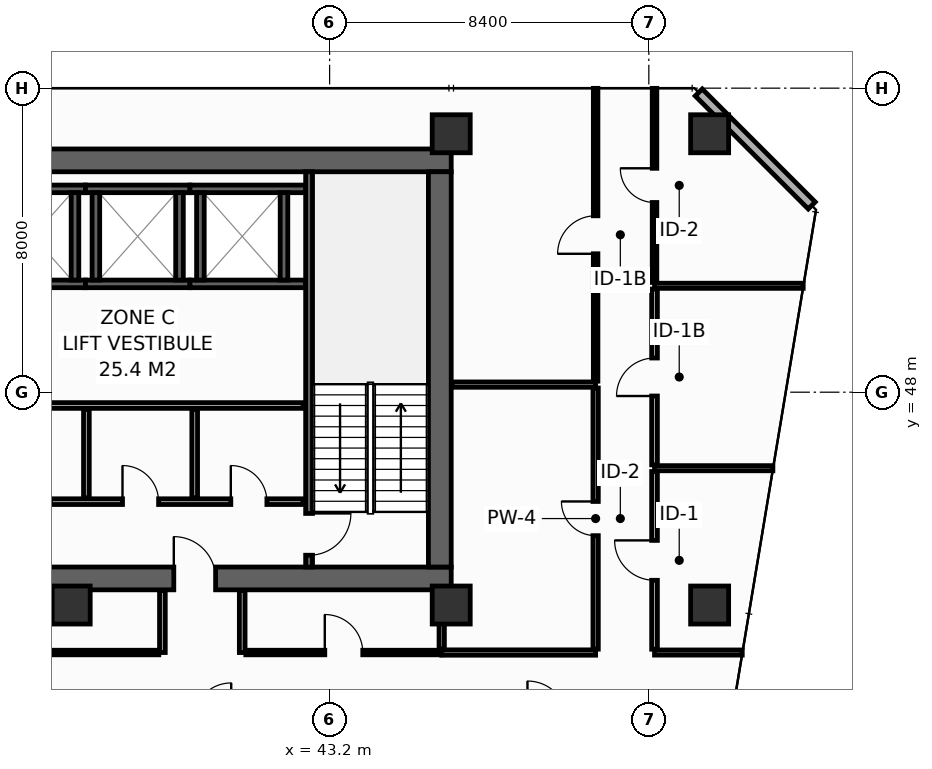
"""IFC4 building model, lengths in metres.
Left out: names, types, materials, properties, quantities, classifications, styles, units other than length and angle.
Written with IfcOpenShell. Run it as: python <this file> out.ifc"""

import sys

from ifc_helpers import new_model, si_unit, direction, frame, frame_2d, origin, origin_2d, place, context, subcontext, project, spatial, rectangle, hollow_rectangle, extrude, element, fill, save


model = new_model("IFC4")
c1 = context("Model", 3, precision=1e-05, world=origin(), true_north=direction((0.0, 1.0)))
c2 = subcontext(c1, "Body", "Model", "MODEL_VIEW")
j1 = project(units=[si_unit("LENGTHUNIT", "METRE"), si_unit("PLANEANGLEUNIT", "RADIAN")], contexts=[c1])
p1 = place(None, origin())
s1 = spatial("IfcSite", under=j1, at=p1, CompositionType="ELEMENT")
p2 = place(p1, origin())
s2 = spatial("IfcBuilding", under=s1, at=p2, CompositionType="ELEMENT")
p3 = place(p2, frame((0.0, 0.0, 106.0)))
s3 = spatial("IfcBuildingStorey", under=s2, at=p3, CompositionType="ELEMENT", Elevation=106.0)
p4 = place(p3, frame((13.5, 43.1, 0.0), z_axis=(0.0, 0.0, 1.0), x_axis=(1.0, 0.0, 0.0)))
e1 = element("IfcWall", 1, at=p4, inside=s3, PredefinedType="SHEAR", context=c2, shape_type="SweptSolid", body=[
    extrude(rectangle(XDim=32.9, YDim=0.6, at=frame_2d((16.45, 0.0))), origin(), (0.0, 0.0, 1.0), 4.15),
])
p5 = place(p4, frame((5.4, 0.0, 0.0)))
e2 = element("IfcOpeningElement", 2, at=p5, cuts=e1, PredefinedType="OPENING", context=c2, shape_type="SweptSolid", body=[
    extrude(rectangle(XDim=1.1, YDim=2.15, at=frame_2d((0.55, 1.075))), frame((0.0, 0.31, 0.0), z_axis=(0.0, -1.0, 0.0), x_axis=(1.0, 0.0, 0.0)), (0.0, 0.0, 1.0), 0.62),
])
p6 = place(p4, frame((25.6, 0.0, 0.0)))
e3 = element("IfcOpeningElement", 3, at=p6, cuts=e1, PredefinedType="OPENING", context=c2, shape_type="SweptSolid", body=[
    extrude(rectangle(XDim=1.1, YDim=2.15, at=frame_2d((0.55, 1.075))), frame((0.0, 0.31, 0.0), z_axis=(0.0, -1.0, 0.0), x_axis=(1.0, 0.0, 0.0)), (0.0, 0.0, 1.0), 0.62),
])
p7 = place(p3, frame((13.5, 54.1, 0.0), z_axis=(0.0, 0.0, 1.0), x_axis=(1.0, 0.0, 0.0)))
e4 = element("IfcWall", 4, at=p7, inside=s3, PredefinedType="SHEAR", context=c2, shape_type="SweptSolid", body=[
    extrude(rectangle(XDim=32.9, YDim=0.6, at=frame_2d((16.45, 0.0))), origin(), (0.0, 0.0, 1.0), 4.15),
])
p8 = place(p3, frame((46.1, 43.4, 0.0), z_axis=(0.0, 0.0, 1.0), x_axis=(0.0, 1.0, 0.0)))
e5 = element("IfcWall", 5, at=p8, inside=s3, PredefinedType="SHEAR", context=c2, shape_type="SweptSolid", body=[
    extrude(rectangle(XDim=10.4, YDim=0.6, at=frame_2d((5.2, 0.0))), origin(), (0.0, 0.0, 1.0), 4.15),
])
for number, where, z_axis, x_axis in (
    (6, (46.4, 54.8, 0.0), (0.0, 0.0, 1.0), (1.0, 0.0, 0.0)),
    (7, (53.2, 54.8, 0.0), (0.0, 0.0, 1.0), (1.0, 0.0, 0.0)),
    (8, (36.4, 42.4, 0.0), (0.0, 0.0, 1.0), (1.0, 0.0, 0.0)),
    (9, (46.4, 42.4, 0.0), (0.0, 0.0, 1.0), (1.0, 0.0, 0.0)),
    (10, (53.2, 42.4, 0.0), (0.0, 0.0, 1.0), (1.0, 0.0, 0.0)),
):
    element("IfcColumn", number, at=place(p3, frame(where, z_axis=z_axis, x_axis=x_axis)), inside=s3, PredefinedType="COLUMN", context=c2, shape_type="SweptSolid", body=[
        extrude(hollow_rectangle(XDim=1.0, YDim=1.0, WallThickness=0.045, at=origin_2d()), origin(), (0.0, 0.0, 1.0), 4.4),
    ])
for number, where, z_axis, x_axis in (
    (11, (33.95, 50.85, 0.0), (0.0, 0.0, 1.0), (1.0, 0.0, 0.0)),
    (12, (33.95, 53.35, 0.0), (0.0, 0.0, 1.0), (1.0, 0.0, 0.0)),
):
    element("IfcWall", number, at=place(p3, frame(where, z_axis=z_axis, x_axis=x_axis)), inside=s3, PredefinedType="SHEAR", context=c2, shape_type="SweptSolid", body=[
        extrude(rectangle(XDim=2.825, YDim=0.2, at=frame_2d((1.413, 0.0))), origin(), (0.0, 0.0, 1.0), 4.15),
    ])
p9 = place(p3, frame((36.5, 50.95, 0.0), z_axis=(0.0, 0.0, 1.0), x_axis=(0.0, 1.0, 0.0)))
e13 = element("IfcWall", 13, at=p9, inside=s3, PredefinedType="SHEAR", context=c2, shape_type="SweptSolid", body=[
    extrude(rectangle(XDim=2.3, YDim=0.2, at=frame_2d((1.15, 0.0))), origin(), (0.0, 0.0, 1.0), 4.15),
])
for number, where, z_axis, x_axis in (
    (14, (36.775, 50.85, 0.0), (0.0, 0.0, 1.0), (1.0, 0.0, 0.0)),
    (15, (36.775, 53.35, 0.0), (0.0, 0.0, 1.0), (1.0, 0.0, 0.0)),
):
    element("IfcWall", number, at=place(p3, frame(where, z_axis=z_axis, x_axis=x_axis)), inside=s3, PredefinedType="SHEAR", context=c2, shape_type="SweptSolid", body=[
        extrude(rectangle(XDim=2.75, YDim=0.2, at=frame_2d((1.375, 0.0))), origin(), (0.0, 0.0, 1.0), 4.15),
    ])
for number, where, z_axis, x_axis in (
    (16, (37.05, 50.95, 0.0), (0.0, 0.0, 1.0), (0.0, 1.0, 0.0)),
    (17, (39.25, 50.95, 0.0), (0.0, 0.0, 1.0), (0.0, 1.0, 0.0)),
):
    element("IfcWall", number, at=place(p3, frame(where, z_axis=z_axis, x_axis=x_axis)), inside=s3, PredefinedType="SHEAR", context=c2, shape_type="SweptSolid", body=[
        extrude(rectangle(XDim=2.3, YDim=0.2, at=frame_2d((1.15, 0.0))), origin(), (0.0, 0.0, 1.0), 4.15),
    ])
for number, where, z_axis, x_axis in (
    (18, (39.525, 50.85, 0.0), (0.0, 0.0, 1.0), (1.0, 0.0, 0.0)),
    (19, (39.525, 53.35, 0.0), (0.0, 0.0, 1.0), (1.0, 0.0, 0.0)),
):
    element("IfcWall", number, at=place(p3, frame(where, z_axis=z_axis, x_axis=x_axis)), inside=s3, PredefinedType="SHEAR", context=c2, shape_type="SweptSolid", body=[
        extrude(rectangle(XDim=3.045, YDim=0.2, at=frame_2d((1.522, 0.0))), origin(), (0.0, 0.0, 1.0), 4.15),
    ])
for number, where, z_axis, x_axis in (
    (20, (39.8, 50.95, 0.0), (0.0, 0.0, 1.0), (0.0, 1.0, 0.0)),
    (21, (42.0, 50.95, 0.0), (0.0, 0.0, 1.0), (0.0, 1.0, 0.0)),
):
    element("IfcWall", number, at=place(p3, frame(where, z_axis=z_axis, x_axis=x_axis)), inside=s3, PredefinedType="SHEAR", context=c2, shape_type="SweptSolid", body=[
        extrude(rectangle(XDim=2.3, YDim=0.2, at=frame_2d((1.15, 0.0))), origin(), (0.0, 0.0, 1.0), 4.15),
    ])
p10 = place(p3, frame((42.66, 53.8, 0.0), z_axis=(0.0, 0.0, 1.0), x_axis=(0.0, -1.0, 0.0)))
e22 = element("IfcWall", 22, at=p10, inside=s3, PredefinedType="SHEAR", context=c2, shape_type="SweptSolid", body=[
    extrude(rectangle(XDim=10.4, YDim=0.18, at=frame_2d((5.2, 0.0))), origin(), (0.0, 0.0, 1.0), 4.15),
])
p11 = place(p10, frame((8.99, 0.0, 0.0)))
e23 = element("IfcOpeningElement", 23, at=p11, cuts=e22, PredefinedType="OPENING", context=c2, shape_type="SweptSolid", body=[
    extrude(rectangle(XDim=1.1, YDim=2.15, at=frame_2d((0.55, 1.075))), frame((0.0, 0.1, 0.0), z_axis=(0.0, -1.0, 0.0), x_axis=(1.0, 0.0, 0.0)), (0.0, 0.0, 1.0), 0.2),
])
p12 = place(p3, frame((33.95, 45.12, 0.0), z_axis=(0.0, 0.0, 1.0), x_axis=(1.0, 0.0, 0.0)))
e24 = element("IfcWall", 24, at=p12, inside=s3, PredefinedType="PARTITIONING", context=c2, shape_type="SweptSolid", body=[
    extrude(rectangle(XDim=8.55, YDim=0.15, at=frame_2d((4.275, 0.0))), origin(), (0.0, 0.0, 1.0), 4.15),
])
p13 = place(p12, frame((0.95, 0.0, 0.0)))
e25 = element("IfcOpeningElement", 25, at=p13, cuts=e24, PredefinedType="OPENING", context=c2, shape_type="SweptSolid", body=[
    extrude(rectangle(XDim=0.95, YDim=2.15, at=frame_2d((0.475, 1.075))), frame((0.0, 0.085, 0.0), z_axis=(0.0, -1.0, 0.0), x_axis=(1.0, 0.0, 0.0)), (0.0, 0.0, 1.0), 0.17),
])
p14 = place(p12, frame((3.8, 0.0, 0.0)))
e26 = element("IfcOpeningElement", 26, at=p14, cuts=e24, PredefinedType="OPENING", context=c2, shape_type="SweptSolid", body=[
    extrude(rectangle(XDim=0.95, YDim=2.15, at=frame_2d((0.475, 1.075))), frame((0.0, 0.085, 0.0), z_axis=(0.0, -1.0, 0.0), x_axis=(1.0, 0.0, 0.0)), (0.0, 0.0, 1.0), 0.17),
])
p15 = place(p12, frame((6.65, 0.0, 0.0)))
e27 = element("IfcOpeningElement", 27, at=p15, cuts=e24, PredefinedType="OPENING", context=c2, shape_type="SweptSolid", body=[
    extrude(rectangle(XDim=0.95, YDim=2.15, at=frame_2d((0.475, 1.075))), frame((0.0, 0.085, 0.0), z_axis=(0.0, -1.0, 0.0), x_axis=(1.0, 0.0, 0.0)), (0.0, 0.0, 1.0), 0.17),
])
p16 = place(p3, frame((33.95, 47.65, 0.0), z_axis=(0.0, 0.0, 1.0), x_axis=(1.0, 0.0, 0.0)))
e28 = element("IfcWall", 28, at=p16, inside=s3, PredefinedType="PARTITIONING", context=c2, shape_type="SweptSolid", body=[
    extrude(rectangle(XDim=8.55, YDim=0.15, at=frame_2d((4.275, 0.0))), origin(), (0.0, 0.0, 1.0), 4.15),
])
for number, where, z_axis, x_axis in (
    (29, (36.8, 45.22, 0.0), (0.0, 0.0, 1.0), (0.0, 1.0, 0.0)),
    (30, (39.65, 45.22, 0.0), (0.0, 0.0, 1.0), (0.0, 1.0, 0.0)),
):
    element("IfcWall", number, at=place(p3, frame(where, z_axis=z_axis, x_axis=x_axis)), inside=s3, PredefinedType="PARTITIONING", context=c2, shape_type="SweptSolid", body=[
        extrude(rectangle(XDim=2.33, YDim=0.15, at=frame_2d((1.165, 0.0))), origin(), (0.0, 0.0, 1.0), 4.15),
    ])
p17 = place(p3, frame((55.887, 52.913, 0.0), z_axis=(0.0, 0.0, 1.0), x_axis=(-0.707106781187, 0.707106781187, 0.0)))
e31 = element("IfcWall", 31, at=p17, inside=s3, PredefinedType="STANDARD", context=c2, shape_type="SweptSolid", body=[
    extrude(rectangle(XDim=4.206, YDim=0.26, at=frame_2d((2.103, 0.0))), origin(), (0.0, 0.0, 1.0), 4.15),
])
p18 = place(p3, frame((46.15, 41.15, 0.0), z_axis=(0.0, 0.0, 1.0), x_axis=(1.0, 0.0, 0.0)))
e32 = element("IfcWall", 32, at=p18, inside=s3, PredefinedType="PARTITIONING", context=c2, shape_type="SweptSolid", body=[
    extrude(rectangle(XDim=4.05, YDim=0.14, at=frame_2d((2.025, 0.0))), origin(), (0.0, 0.0, 1.0), 4.15),
])
p19 = place(p3, frame((46.15, 41.24, 0.0), z_axis=(0.0, 0.0, 1.0), x_axis=(0.0, 1.0, 0.0)))
e33 = element("IfcWall", 33, at=p19, inside=s3, PredefinedType="PARTITIONING", context=c2, shape_type="SweptSolid", body=[
    extrude(rectangle(XDim=1.54, YDim=0.14, at=frame_2d((0.77, 0.0))), origin(), (0.0, 0.0, 1.0), 4.15),
])
p20 = place(p3, frame((46.42, 48.2, 0.0), z_axis=(0.0, 0.0, 1.0), x_axis=(1.0, 0.0, 0.0)))
e34 = element("IfcWall", 34, at=p20, inside=s3, PredefinedType="PARTITIONING", context=c2, shape_type="SweptSolid", body=[
    extrude(rectangle(XDim=3.78, YDim=0.14, at=frame_2d((1.89, 0.0))), origin(), (0.0, 0.0, 1.0), 4.15),
])
p21 = place(p3, frame((50.2, 41.24, 0.0), z_axis=(0.0, 0.0, 1.0), x_axis=(0.0, 1.0, 0.0)))
e35 = element("IfcWall", 35, at=p21, inside=s3, PredefinedType="PARTITIONING", context=c2, shape_type="SweptSolid", body=[
    extrude(rectangle(XDim=6.87, YDim=0.14, at=frame_2d((3.435, 0.0))), origin(), (0.0, 0.0, 1.0), 3.335),
])
p22 = place(p21, frame((2.985, 0.0, 0.0)))
e36 = element("IfcOpeningElement", 36, at=p22, cuts=e35, PredefinedType="OPENING", context=c2, shape_type="SweptSolid", body=[
    extrude(rectangle(XDim=0.9, YDim=2.1, at=frame_2d((0.45, 1.05))), frame((0.0, 0.08, 0.0), z_axis=(0.0, -1.0, 0.0), x_axis=(1.0, 0.0, 0.0)), (0.0, 0.0, 1.0), 0.16),
])
p23 = place(p3, frame((50.2, 48.29, 0.0), z_axis=(0.0, 0.0, 1.0), x_axis=(0.0, 1.0, 0.0)))
e37 = element("IfcWall", 37, at=p23, inside=s3, PredefinedType="PARTITIONING", context=c2, shape_type="SweptSolid", body=[
    extrude(rectangle(XDim=7.705, YDim=0.12, at=frame_2d((3.853, 0.0))), origin(), (0.0, 0.0, 1.0), 3.435),
])
p24 = place(p23, frame((3.352, 0.0, 0.0)))
e38 = element("IfcOpeningElement", 38, at=p24, cuts=e37, PredefinedType="OPENING", context=c2, shape_type="SweptSolid", body=[
    extrude(rectangle(XDim=1.0, YDim=2.15, at=frame_2d((0.5, 1.075))), frame((0.0, 0.07, 0.0), z_axis=(0.0, -1.0, 0.0), x_axis=(1.0, 0.0, 0.0)), (0.0, 0.0, 1.0), 0.14),
])
p25 = place(p3, frame((51.75, 41.15, 0.0), z_axis=(0.0, 0.0, 1.0), x_axis=(1.0, 0.0, 0.0)))
e39 = element("IfcWall", 39, at=p25, inside=s3, PredefinedType="PARTITIONING", context=c2, shape_type="SweptSolid", body=[
    extrude(rectangle(XDim=2.308, YDim=0.135, at=frame_2d((1.154, 0.0))), origin(), (0.0, 0.0, 1.0), 3.635),
])
p26 = place(p3, frame((51.75, 46.0, 0.0), z_axis=(0.0, 0.0, 1.0), x_axis=(1.0, 0.0, 0.0)))
e40 = element("IfcWall", 40, at=p26, inside=s3, PredefinedType="PARTITIONING", context=c2, shape_type="SweptSolid", body=[
    extrude(rectangle(XDim=3.115, YDim=0.135, at=frame_2d((1.557, 0.0))), origin(), (0.0, 0.0, 1.0), 3.335),
])
p27 = place(p3, frame((51.75, 50.8, 0.0), z_axis=(0.0, 0.0, 1.0), x_axis=(1.0, 0.0, 0.0)))
e41 = element("IfcWall", 41, at=p27, inside=s3, PredefinedType="PARTITIONING", context=c2, shape_type="SweptSolid", body=[
    extrude(rectangle(XDim=3.912, YDim=0.135, at=frame_2d((1.956, 0.0))), origin(), (0.0, 0.0, 1.0), 3.335),
])
p28 = place(p3, frame((51.75, 41.238, 0.0), z_axis=(0.0, 0.0, 1.0), x_axis=(0.0, 1.0, 0.0)))
e42 = element("IfcWall", 42, at=p28, inside=s3, PredefinedType="PARTITIONING", context=c2, shape_type="SweptSolid", body=[
    extrude(rectangle(XDim=4.675, YDim=0.15, at=frame_2d((2.337, 0.0))), origin(), (0.0, 0.0, 1.0), 3.335),
])
p29 = place(p28, frame((1.813, 0.0, 0.0)))
e43 = element("IfcOpeningElement", 43, at=p29, cuts=e42, PredefinedType="OPENING", context=c2, shape_type="SweptSolid", body=[
    extrude(rectangle(XDim=1.05, YDim=2.15, at=frame_2d((0.525, 1.075))), frame((0.0, 0.085, 0.0), z_axis=(0.0, -1.0, 0.0), x_axis=(1.0, 0.0, 0.0)), (0.0, 0.0, 1.0), 0.17),
])
p30 = place(p3, frame((51.75, 46.087, 0.0), z_axis=(0.0, 0.0, 1.0), x_axis=(0.0, 1.0, 0.0)))
e44 = element("IfcWall", 44, at=p30, inside=s3, PredefinedType="PARTITIONING", context=c2, shape_type="SweptSolid", body=[
    extrude(rectangle(XDim=4.625, YDim=0.15, at=frame_2d((2.312, 0.0))), origin(), (0.0, 0.0, 1.0), 4.15),
])
p31 = place(p30, frame((1.812, 0.0, 0.0)))
e45 = element("IfcOpeningElement", 45, at=p31, cuts=e44, PredefinedType="OPENING", context=c2, shape_type="SweptSolid", body=[
    extrude(rectangle(XDim=1.0, YDim=2.15, at=frame_2d((0.5, 1.075))), frame((0.0, 0.085, 0.0), z_axis=(0.0, -1.0, 0.0), x_axis=(1.0, 0.0, 0.0)), (0.0, 0.0, 1.0), 0.17),
])
p32 = place(p3, frame((51.75, 50.887, 0.0), z_axis=(0.0, 0.0, 1.0), x_axis=(0.0, 1.0, 0.0)))
e46 = element("IfcWall", 46, at=p32, inside=s3, PredefinedType="PARTITIONING", context=c2, shape_type="SweptSolid", body=[
    extrude(rectangle(XDim=5.108, YDim=0.12, at=frame_2d((2.554, 0.0))), origin(), (0.0, 0.0, 1.0), 3.435),
])
p33 = place(p32, frame((2.104, 0.0, 0.0)))
e47 = element("IfcOpeningElement", 47, at=p33, cuts=e46, PredefinedType="OPENING", context=c2, shape_type="SweptSolid", body=[
    extrude(rectangle(XDim=0.9, YDim=2.1, at=frame_2d((0.45, 1.05))), frame((0.0, 0.07, 0.0), z_axis=(0.0, -1.0, 0.0), x_axis=(1.0, 0.0, 0.0)), (0.0, 0.0, 1.0), 0.14),
])
for number, where, z_axis, x_axis in (
    (48, (38.8, 41.15, 0.0), (0.0, 0.0, 1.0), (0.0, 1.0, 0.0)),
    (49, (40.9, 41.15, 0.0), (0.0, 0.0, 1.0), (0.0, 1.0, 0.0)),
):
    element("IfcWall", number, at=place(p3, frame(where, z_axis=z_axis, x_axis=x_axis)), inside=s3, PredefinedType="PARTITIONING", context=c2, shape_type="SweptSolid", body=[
        extrude(rectangle(XDim=1.63, YDim=0.15, at=frame_2d((0.815, 0.0))), origin(), (0.0, 0.0, 1.0), 4.15),
    ])
p34 = place(p3, frame((20.795, 41.15, 0.0), z_axis=(0.0, 0.0, 1.0), x_axis=(1.0, 0.0, 0.0)))
e50 = element("IfcWall", 50, at=p34, inside=s3, PredefinedType="PARTITIONING", context=c2, shape_type="SweptSolid", body=[
    extrude(rectangle(XDim=17.91, YDim=0.12, at=frame_2d((8.955, 0.0))), origin(), (0.0, 0.0, 1.0), 3.335),
])
p35 = place(p34, frame((8.455, 0.0, 0.0)))
e51 = element("IfcOpeningElement", 51, at=p35, cuts=e50, PredefinedType="OPENING", context=c2, shape_type="SweptSolid", body=[
    extrude(rectangle(XDim=1.0, YDim=2.15, at=frame_2d((0.5, 1.075))), frame((0.0, 0.07, 0.0), z_axis=(0.0, -1.0, 0.0), x_axis=(1.0, 0.0, 0.0)), (0.0, 0.0, 1.0), 0.14),
])
p36 = place(p3, frame((40.995, 41.15, 0.0), z_axis=(0.0, 0.0, 1.0), x_axis=(1.0, 0.0, 0.0)))
e52 = element("IfcWall", 52, at=p36, inside=s3, PredefinedType="PARTITIONING", context=c2, shape_type="SweptSolid", body=[
    extrude(rectangle(XDim=5.155, YDim=0.12, at=frame_2d((2.577, 0.0))), origin(), (0.0, 0.0, 1.0), 4.15),
])
p37 = place(p36, frame((2.078, 0.0, 0.0)))
e53 = element("IfcOpeningElement", 53, at=p37, cuts=e52, PredefinedType="OPENING", context=c2, shape_type="SweptSolid", body=[
    extrude(rectangle(XDim=1.0, YDim=2.15, at=frame_2d((0.5, 1.075))), frame((0.0, 0.07, 0.0), z_axis=(0.0, -1.0, 0.0), x_axis=(1.0, 0.0, 0.0)), (0.0, 0.0, 1.0), 0.14),
])
p38 = place(p11, origin())
e54 = element("IfcDoor", 54, at=p38, inside=s3, OperationType="SINGLE_SWING_LEFT", PredefinedType="DOOR", context=c2, shape_type="SweptSolid", body=[
    extrude(rectangle(XDim=1.1, YDim=2.15, at=frame_2d((0.55, 1.075))), frame((0.0, 0.025, 0.0), z_axis=(0.0, -1.0, 0.0), x_axis=(1.0, 0.0, 0.0)), (0.0, 0.0, 1.0), 0.05),
])
fill(e23, e54)
p39 = place(p6, origin())
e55 = element("IfcDoor", 55, at=p39, inside=s3, OperationType="SINGLE_SWING_LEFT", PredefinedType="DOOR", context=c2, shape_type="SweptSolid", body=[
    extrude(rectangle(XDim=1.1, YDim=2.15, at=frame_2d((0.55, 1.075))), frame((0.0, 0.025, 0.0), z_axis=(0.0, -1.0, 0.0), x_axis=(1.0, 0.0, 0.0)), (0.0, 0.0, 1.0), 0.05),
])
fill(e3, e55)
p40 = place(p14, origin())
e56 = element("IfcDoor", 56, at=p40, inside=s3, OperationType="SINGLE_SWING_LEFT", PredefinedType="DOOR", context=c2, shape_type="SweptSolid", body=[
    extrude(rectangle(XDim=0.95, YDim=2.15, at=frame_2d((0.475, 1.075))), frame((0.0, 0.025, 0.0), z_axis=(0.0, -1.0, 0.0), x_axis=(1.0, 0.0, 0.0)), (0.0, 0.0, 1.0), 0.05),
])
fill(e26, e56)
p41 = place(p15, origin())
e57 = element("IfcDoor", 57, at=p41, inside=s3, OperationType="SINGLE_SWING_LEFT", PredefinedType="DOOR", context=c2, shape_type="SweptSolid", body=[
    extrude(rectangle(XDim=0.95, YDim=2.15, at=frame_2d((0.475, 1.075))), frame((0.0, 0.025, 0.0), z_axis=(0.0, -1.0, 0.0), x_axis=(1.0, 0.0, 0.0)), (0.0, 0.0, 1.0), 0.05),
])
fill(e27, e57)
p42 = place(p22, origin())
e58 = element("IfcDoor", 58, at=p42, inside=s3, OperationType="SINGLE_SWING_RIGHT", PredefinedType="DOOR", context=c2, shape_type="SweptSolid", body=[
    extrude(rectangle(XDim=0.9, YDim=2.1, at=frame_2d((0.45, 1.05))), frame((0.0, 0.025, 0.0), z_axis=(0.0, -1.0, 0.0), x_axis=(1.0, 0.0, 0.0)), (0.0, 0.0, 1.0), 0.05),
])
fill(e36, e58)
p43 = place(p24, origin())
e59 = element("IfcDoor", 59, at=p43, inside=s3, OperationType="SINGLE_SWING_LEFT", PredefinedType="DOOR", context=c2, shape_type="SweptSolid", body=[
    extrude(rectangle(XDim=1.0, YDim=2.15, at=frame_2d((0.5, 1.075))), frame((0.0, 0.025, 0.0), z_axis=(0.0, -1.0, 0.0), x_axis=(1.0, 0.0, 0.0)), (0.0, 0.0, 1.0), 0.05),
])
fill(e38, e59)
p44 = place(p29, origin())
e60 = element("IfcDoor", 60, at=p44, inside=s3, OperationType="SINGLE_SWING_RIGHT", PredefinedType="DOOR", context=c2, shape_type="SweptSolid", body=[
    extrude(rectangle(XDim=1.05, YDim=2.15, at=frame_2d((0.525, 1.075))), frame((0.0, 0.025, 0.0), z_axis=(0.0, -1.0, 0.0), x_axis=(1.0, 0.0, 0.0)), (0.0, 0.0, 1.0), 0.05),
])
fill(e43, e60)
p45 = place(p31, origin())
e61 = element("IfcDoor", 61, at=p45, inside=s3, OperationType="SINGLE_SWING_LEFT", PredefinedType="DOOR", context=c2, shape_type="SweptSolid", body=[
    extrude(rectangle(XDim=1.0, YDim=2.15, at=frame_2d((0.5, 1.075))), frame((0.0, 0.025, 0.0), z_axis=(0.0, -1.0, 0.0), x_axis=(1.0, 0.0, 0.0)), (0.0, 0.0, 1.0), 0.05),
])
fill(e45, e61)
p46 = place(p33, origin())
e62 = element("IfcDoor", 62, at=p46, inside=s3, OperationType="SINGLE_SWING_RIGHT", PredefinedType="DOOR", context=c2, shape_type="SweptSolid", body=[
    extrude(rectangle(XDim=0.9, YDim=2.1, at=frame_2d((0.45, 1.05))), frame((0.0, 0.025, 0.0), z_axis=(0.0, -1.0, 0.0), x_axis=(1.0, 0.0, 0.0)), (0.0, 0.0, 1.0), 0.05),
])
fill(e47, e62)
p47 = place(p37, origin())
e63 = element("IfcDoor", 63, at=p47, inside=s3, OperationType="SINGLE_SWING_LEFT", PredefinedType="DOOR", context=c2, shape_type="SweptSolid", body=[
    extrude(rectangle(XDim=1.0, YDim=2.15, at=frame_2d((0.5, 1.075))), frame((0.0, 0.025, 0.0), z_axis=(0.0, -1.0, 0.0), x_axis=(1.0, 0.0, 0.0)), (0.0, 0.0, 1.0), 0.05),
])
fill(e53, e63)
save(model, sys.argv[1])
